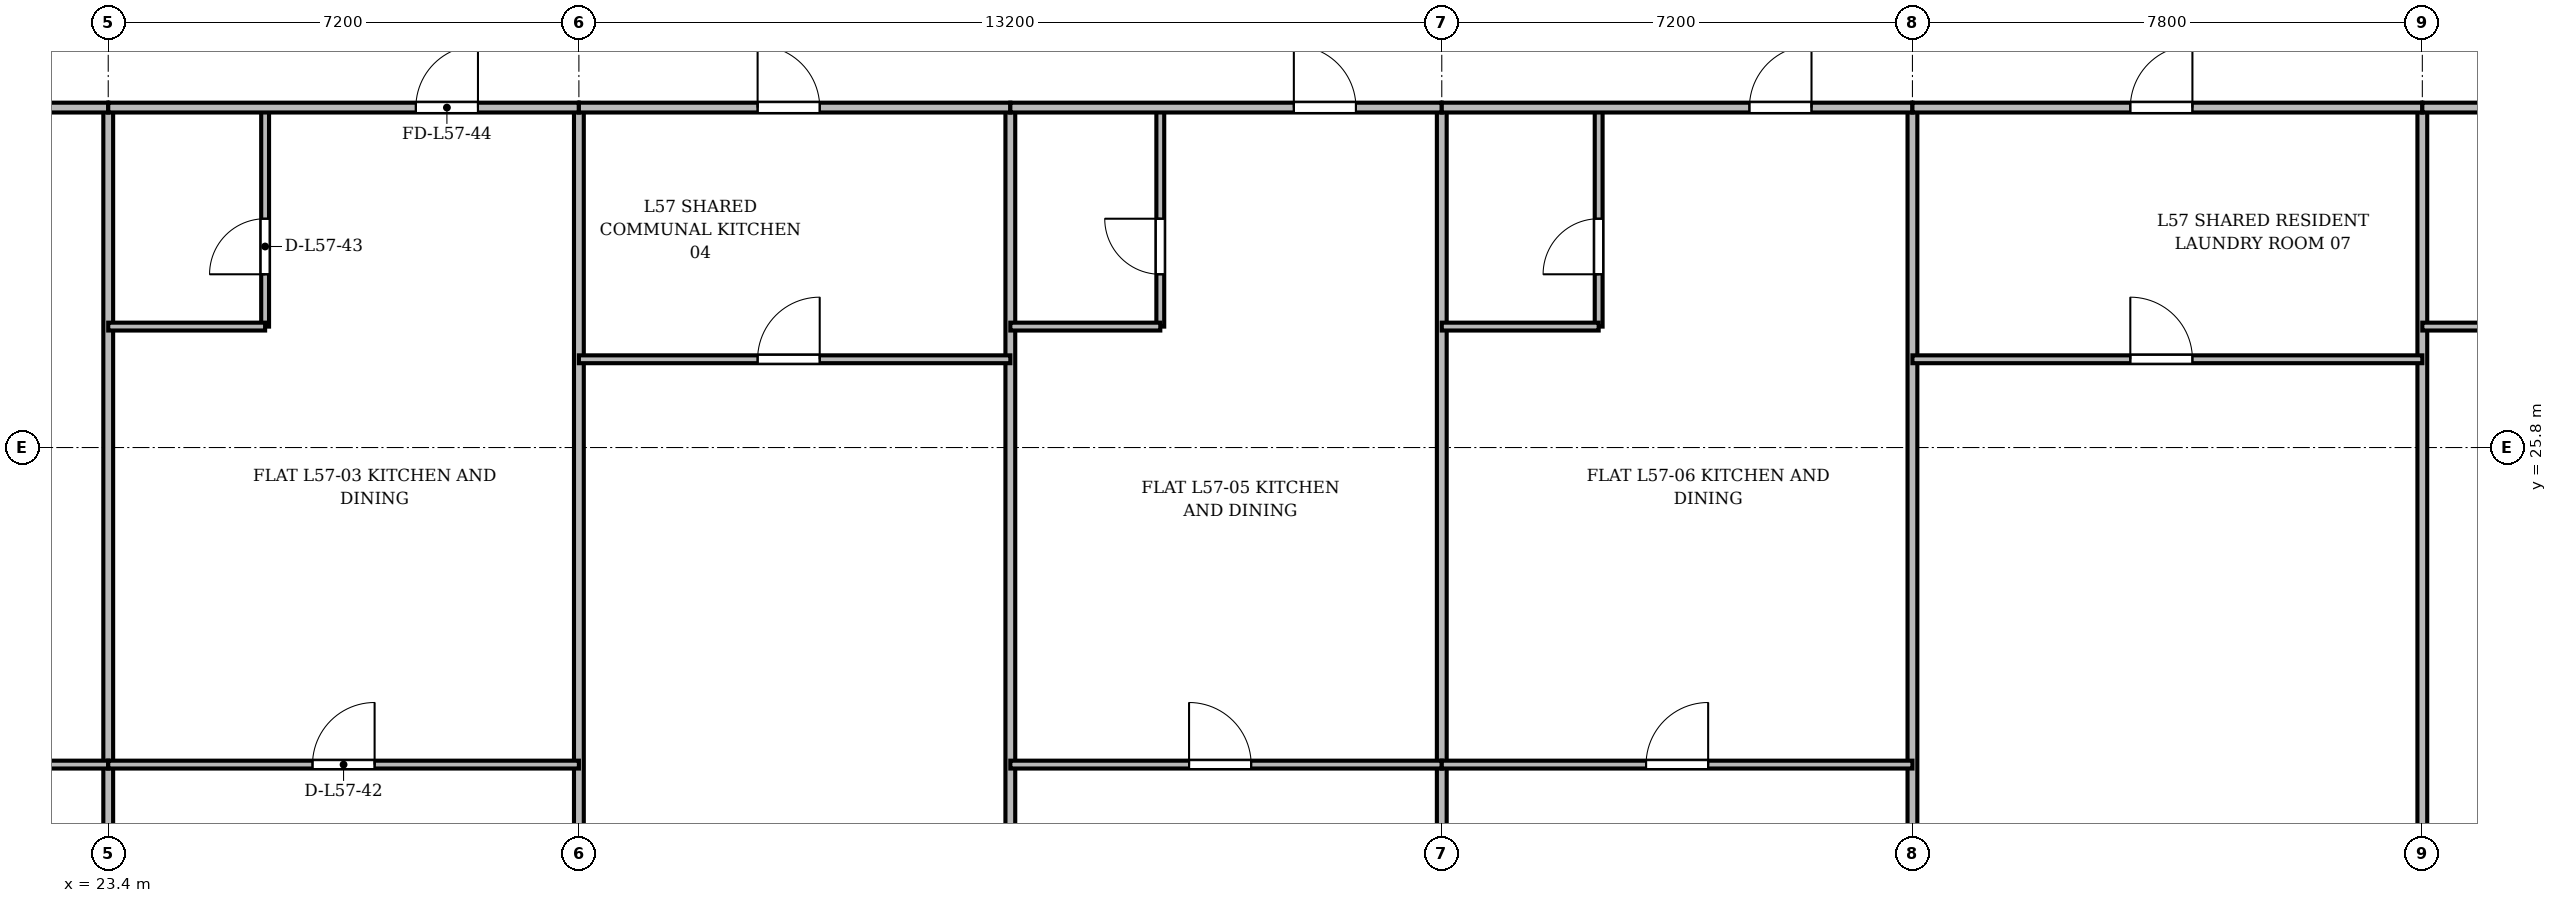
"""IFC4 building model, lengths in metres.
Left out: names, types, materials, properties, quantities, classifications, styles, units other than length and angle.
Written with IfcOpenShell. Run it as: python <this file> out.ifc"""

import sys

from ifc_helpers import new_model, si_unit, direction, frame, frame_2d, origin, place, context, subcontext, project, spatial, rectangle, extrude, source, transform, mapped, element, fill, save


model = new_model("IFC4")
c1 = context("Model", 3, precision=1e-05, world=origin(), true_north=direction((0.0, 1.0)))
c2 = subcontext(c1, "Body", "Model", "MODEL_VIEW")
j1 = project(units=[si_unit("LENGTHUNIT", "METRE"), si_unit("PLANEANGLEUNIT", "RADIAN")], contexts=[c1])
p1 = place(None, origin())
s1 = spatial("IfcSite", under=j1, at=p1, CompositionType="ELEMENT")
p2 = place(p1, origin())
s2 = spatial("IfcBuilding", under=s1, at=p2, CompositionType="ELEMENT")
p3 = place(p2, frame((0.0, 0.0, 219.3)))
s3 = spatial("IfcBuildingStorey", under=s2, at=p3, CompositionType="ELEMENT", Elevation=219.3)
for number, where, z_axis, x_axis in (
    (1, (23.4, 3.625, 0.0), (0.0, 0.0, 1.0), (0.0, 1.0, 0.0)),
    (2, (30.6, 3.625, 0.0), (0.0, 0.0, 1.0), (0.0, 1.0, 0.0)),
):
    element("IfcWall", number, at=place(p3, frame(where, z_axis=z_axis, x_axis=x_axis)), inside=s3, PredefinedType="PARTITIONING", context=c2, shape_type="SweptSolid", body=[
        extrude(rectangle(XDim=27.375, YDim=0.15, at=frame_2d((13.688, 0.0))), origin(), (0.0, 0.0, 1.0), 2.86),
    ])
p4 = place(p3, frame((37.2, 3.625, 0.0), z_axis=(0.0, 0.0, 1.0), x_axis=(0.0, 1.0, 0.0)))
e3 = element("IfcWall", 3, at=p4, inside=s3, PredefinedType="PARTITIONING", context=c2, shape_type="SweptSolid", body=[
    extrude(rectangle(XDim=27.375, YDim=0.15, at=frame_2d((13.688, 0.0))), origin(), (0.0, 0.0, 1.0), 2.91),
])
for number, where, z_axis, x_axis in (
    (4, (43.8, 3.625, 0.0), (0.0, 0.0, 1.0), (0.0, 1.0, 0.0)),
    (5, (51.0, 3.625, 0.0), (0.0, 0.0, 1.0), (0.0, 1.0, 0.0)),
    (6, (58.8, 3.625, 0.0), (0.0, 0.0, 1.0), (0.0, 1.0, 0.0)),
):
    element("IfcWall", number, at=place(p3, frame(where, z_axis=z_axis, x_axis=x_axis)), inside=s3, PredefinedType="PARTITIONING", context=c2, shape_type="SweptSolid", body=[
        extrude(rectangle(XDim=27.375, YDim=0.15, at=frame_2d((13.688, 0.0))), origin(), (0.0, 0.0, 1.0), 2.86),
    ])
p5 = place(p3, frame((15.6, 20.95, 0.0), z_axis=(0.0, 0.0, 1.0), x_axis=(1.0, 0.0, 0.0)))
e7 = element("IfcWall", 7, at=p5, inside=s3, PredefinedType="PARTITIONING", context=c2, shape_type="SweptSolid", body=[
    extrude(rectangle(XDim=7.8, YDim=0.12, at=frame_2d((3.9, 0.0))), origin(), (0.0, 0.0, 1.0), 2.86),
])
p6 = place(p5, frame((3.333, 0.0, 0.0)))
e8 = element("IfcOpeningElement", 8, at=p6, cuts=e7, PredefinedType="OPENING", context=c2, shape_type="SweptSolid", body=[
    extrude(rectangle(XDim=0.95, YDim=2.15, at=frame_2d((0.475, 1.075))), frame((0.0, 0.07, 0.0), z_axis=(0.0, -1.0, 0.0), x_axis=(1.0, 0.0, 0.0)), (0.0, 0.0, 1.0), 0.14),
])
p7 = place(p3, frame((15.6, 31.0, 0.0), z_axis=(0.0, 0.0, 1.0), x_axis=(1.0, 0.0, 0.0)))
e9 = element("IfcWall", 9, at=p7, inside=s3, PredefinedType="PARTITIONING", context=c2, shape_type="SweptSolid", body=[
    extrude(rectangle(XDim=7.8, YDim=0.15, at=frame_2d((3.9, 0.0))), origin(), (0.0, 0.0, 1.0), 2.86),
])
p8 = place(p7, frame((5.172, 0.0, 0.0)))
e10 = element("IfcOpeningElement", 10, at=p8, cuts=e9, PredefinedType="OPENING", context=c2, shape_type="SweptSolid", body=[
    extrude(rectangle(XDim=0.95, YDim=2.15, at=frame_2d((0.475, 1.075))), frame((0.0, 0.085, 0.0), z_axis=(0.0, -1.0, 0.0), x_axis=(1.0, 0.0, 0.0)), (0.0, 0.0, 1.0), 0.17),
])
p9 = place(p3, frame((23.4, 20.95, 0.0), z_axis=(0.0, 0.0, 1.0), x_axis=(1.0, 0.0, 0.0)))
e11 = element("IfcWall", 11, at=p9, inside=s3, PredefinedType="PARTITIONING", context=c2, shape_type="SweptSolid", body=[
    extrude(rectangle(XDim=7.2, YDim=0.12, at=frame_2d((3.6, 0.0))), origin(), (0.0, 0.0, 1.0), 2.86),
])
p10 = place(p9, frame((3.125, 0.0, 0.0)))
e12 = element("IfcOpeningElement", 12, at=p10, cuts=e11, PredefinedType="OPENING", context=c2, shape_type="SweptSolid", body=[
    extrude(rectangle(XDim=0.95, YDim=2.15, at=frame_2d((0.475, 1.075))), frame((0.0, 0.07, 0.0), z_axis=(0.0, -1.0, 0.0), x_axis=(1.0, 0.0, 0.0)), (0.0, 0.0, 1.0), 0.14),
])
p11 = place(p3, frame((25.8, 27.65, 0.0), z_axis=(0.0, 0.0, 1.0), x_axis=(0.0, 1.0, 0.0)))
e13 = element("IfcWall", 13, at=p11, inside=s3, PredefinedType="PARTITIONING", context=c2, shape_type="SweptSolid", body=[
    extrude(rectangle(XDim=3.35, YDim=0.12, at=frame_2d((1.675, 0.0))), origin(), (0.0, 0.0, 1.0), 3.36),
])
p12 = place(p11, frame((0.8, 0.0, 0.0)))
e14 = element("IfcOpeningElement", 14, at=p12, cuts=e13, PredefinedType="OPENING", context=c2, shape_type="SweptSolid", body=[
    extrude(rectangle(XDim=0.85, YDim=2.1, at=frame_2d((0.425, 1.05))), frame((0.0, 0.07, 0.0), z_axis=(0.0, -1.0, 0.0), x_axis=(1.0, 0.0, 0.0)), (0.0, 0.0, 1.0), 0.14),
])
p13 = place(p3, frame((23.4, 27.65, 0.0), z_axis=(0.0, 0.0, 1.0), x_axis=(1.0, 0.0, 0.0)))
e15 = element("IfcWall", 15, at=p13, inside=s3, PredefinedType="PARTITIONING", context=c2, shape_type="SweptSolid", body=[
    extrude(rectangle(XDim=2.4, YDim=0.12, at=frame_2d((1.2, 0.0))), origin(), (0.0, 0.0, 1.0), 2.86),
])
p14 = place(p3, frame((23.4, 31.0, 0.0), z_axis=(0.0, 0.0, 1.0), x_axis=(1.0, 0.0, 0.0)))
e16 = element("IfcWall", 16, at=p14, inside=s3, PredefinedType="PARTITIONING", context=c2, shape_type="SweptSolid", body=[
    extrude(rectangle(XDim=7.2, YDim=0.15, at=frame_2d((3.6, 0.0))), origin(), (0.0, 0.0, 1.0), 2.86),
])
p15 = place(p14, frame((4.706, 0.0, 0.0)))
e17 = element("IfcOpeningElement", 17, at=p15, cuts=e16, PredefinedType="OPENING", context=c2, shape_type="SweptSolid", body=[
    extrude(rectangle(XDim=0.95, YDim=2.15, at=frame_2d((0.475, 1.075))), frame((0.0, 0.085, 0.0), z_axis=(0.0, -1.0, 0.0), x_axis=(1.0, 0.0, 0.0)), (0.0, 0.0, 1.0), 0.17),
])
p16 = place(p3, frame((30.6, 31.0, 0.0), z_axis=(0.0, 0.0, 1.0), x_axis=(1.0, 0.0, 0.0)))
e18 = element("IfcWall", 18, at=p16, inside=s3, PredefinedType="PARTITIONING", context=c2, shape_type="SweptSolid", body=[
    extrude(rectangle(XDim=6.6, YDim=0.15, at=frame_2d((3.3, 0.0))), origin(), (0.0, 0.0, 1.0), 2.86),
])
p17 = place(p16, frame((2.734, 0.0, 0.0)))
e19 = element("IfcOpeningElement", 19, at=p17, cuts=e18, PredefinedType="OPENING", context=c2, shape_type="SweptSolid", body=[
    extrude(rectangle(XDim=0.95, YDim=2.15, at=frame_2d((0.475, 1.075))), frame((0.0, 0.085, 0.0), z_axis=(0.0, -1.0, 0.0), x_axis=(1.0, 0.0, 0.0)), (0.0, 0.0, 1.0), 0.17),
])
p18 = place(p3, frame((30.6, 27.15, 0.0), z_axis=(0.0, 0.0, 1.0), x_axis=(1.0, 0.0, 0.0)))
e20 = element("IfcWall", 20, at=p18, inside=s3, PredefinedType="PARTITIONING", context=c2, shape_type="SweptSolid", body=[
    extrude(rectangle(XDim=6.6, YDim=0.12, at=frame_2d((3.3, 0.0))), origin(), (0.0, 0.0, 1.0), 2.86),
])
p19 = place(p18, frame((2.734, 0.0, 0.0)))
e21 = element("IfcOpeningElement", 21, at=p19, cuts=e20, PredefinedType="OPENING", context=c2, shape_type="SweptSolid", body=[
    extrude(rectangle(XDim=0.95, YDim=2.15, at=frame_2d((0.475, 1.075))), frame((0.0, 0.07, 0.0), z_axis=(0.0, -1.0, 0.0), x_axis=(1.0, 0.0, 0.0)), (0.0, 0.0, 1.0), 0.14),
])
p20 = place(p3, frame((37.2, 20.95, 0.0), z_axis=(0.0, 0.0, 1.0), x_axis=(1.0, 0.0, 0.0)))
e22 = element("IfcWall", 22, at=p20, inside=s3, PredefinedType="PARTITIONING", context=c2, shape_type="SweptSolid", body=[
    extrude(rectangle(XDim=6.6, YDim=0.12, at=frame_2d((3.3, 0.0))), origin(), (0.0, 0.0, 1.0), 2.86),
])
p21 = place(p20, frame((2.734, 0.0, 0.0)))
e23 = element("IfcOpeningElement", 23, at=p21, cuts=e22, PredefinedType="OPENING", context=c2, shape_type="SweptSolid", body=[
    extrude(rectangle(XDim=0.95, YDim=2.15, at=frame_2d((0.475, 1.075))), frame((0.0, 0.07, 0.0), z_axis=(0.0, -1.0, 0.0), x_axis=(1.0, 0.0, 0.0)), (0.0, 0.0, 1.0), 0.14),
])
p22 = place(p3, frame((39.494, 27.65, 0.0), z_axis=(0.0, 0.0, 1.0), x_axis=(0.0, 1.0, 0.0)))
e24 = element("IfcWall", 24, at=p22, inside=s3, PredefinedType="PARTITIONING", context=c2, shape_type="SweptSolid", body=[
    extrude(rectangle(XDim=3.35, YDim=0.12, at=frame_2d((1.675, 0.0))), origin(), (0.0, 0.0, 1.0), 3.36),
])
p23 = place(p22, frame((0.8, 0.0, 0.0)))
e25 = element("IfcOpeningElement", 25, at=p23, cuts=e24, PredefinedType="OPENING", context=c2, shape_type="SweptSolid", body=[
    extrude(rectangle(XDim=0.85, YDim=2.1, at=frame_2d((0.425, 1.05))), frame((0.0, 0.07, 0.0), z_axis=(0.0, -1.0, 0.0), x_axis=(1.0, 0.0, 0.0)), (0.0, 0.0, 1.0), 0.14),
])
p24 = place(p3, frame((37.2, 27.65, 0.0), z_axis=(0.0, 0.0, 1.0), x_axis=(1.0, 0.0, 0.0)))
e26 = element("IfcWall", 26, at=p24, inside=s3, PredefinedType="PARTITIONING", context=c2, shape_type="SweptSolid", body=[
    extrude(rectangle(XDim=2.294, YDim=0.12, at=frame_2d((1.147, 0.0))), origin(), (0.0, 0.0, 1.0), 3.36),
])
p25 = place(p3, frame((37.2, 31.0, 0.0), z_axis=(0.0, 0.0, 1.0), x_axis=(1.0, 0.0, 0.0)))
e27 = element("IfcWall", 27, at=p25, inside=s3, PredefinedType="PARTITIONING", context=c2, shape_type="SweptSolid", body=[
    extrude(rectangle(XDim=6.6, YDim=0.15, at=frame_2d((3.3, 0.0))), origin(), (0.0, 0.0, 1.0), 2.86),
])
p26 = place(p25, frame((4.337, 0.0, 0.0)))
e28 = element("IfcOpeningElement", 28, at=p26, cuts=e27, PredefinedType="OPENING", context=c2, shape_type="SweptSolid", body=[
    extrude(rectangle(XDim=0.95, YDim=2.15, at=frame_2d((0.475, 1.075))), frame((0.0, 0.085, 0.0), z_axis=(0.0, -1.0, 0.0), x_axis=(1.0, 0.0, 0.0)), (0.0, 0.0, 1.0), 0.17),
])
p27 = place(p3, frame((43.8, 20.95, 0.0), z_axis=(0.0, 0.0, 1.0), x_axis=(1.0, 0.0, 0.0)))
e29 = element("IfcWall", 29, at=p27, inside=s3, PredefinedType="PARTITIONING", context=c2, shape_type="SweptSolid", body=[
    extrude(rectangle(XDim=7.2, YDim=0.12, at=frame_2d((3.6, 0.0))), origin(), (0.0, 0.0, 1.0), 2.86),
])
p28 = place(p27, frame((3.125, 0.0, 0.0)))
e30 = element("IfcOpeningElement", 30, at=p28, cuts=e29, PredefinedType="OPENING", context=c2, shape_type="SweptSolid", body=[
    extrude(rectangle(XDim=0.95, YDim=2.15, at=frame_2d((0.475, 1.075))), frame((0.0, 0.07, 0.0), z_axis=(0.0, -1.0, 0.0), x_axis=(1.0, 0.0, 0.0)), (0.0, 0.0, 1.0), 0.14),
])
p29 = place(p3, frame((46.2, 27.65, 0.0), z_axis=(0.0, 0.0, 1.0), x_axis=(0.0, 1.0, 0.0)))
e31 = element("IfcWall", 31, at=p29, inside=s3, PredefinedType="PARTITIONING", context=c2, shape_type="SweptSolid", body=[
    extrude(rectangle(XDim=3.35, YDim=0.12, at=frame_2d((1.675, 0.0))), origin(), (0.0, 0.0, 1.0), 3.36),
])
p30 = place(p29, frame((0.8, 0.0, 0.0)))
e32 = element("IfcOpeningElement", 32, at=p30, cuts=e31, PredefinedType="OPENING", context=c2, shape_type="SweptSolid", body=[
    extrude(rectangle(XDim=0.85, YDim=2.1, at=frame_2d((0.425, 1.05))), frame((0.0, 0.07, 0.0), z_axis=(0.0, -1.0, 0.0), x_axis=(1.0, 0.0, 0.0)), (0.0, 0.0, 1.0), 0.14),
])
p31 = place(p3, frame((43.8, 27.65, 0.0), z_axis=(0.0, 0.0, 1.0), x_axis=(1.0, 0.0, 0.0)))
e33 = element("IfcWall", 33, at=p31, inside=s3, PredefinedType="PARTITIONING", context=c2, shape_type="SweptSolid", body=[
    extrude(rectangle(XDim=2.4, YDim=0.12, at=frame_2d((1.2, 0.0))), origin(), (0.0, 0.0, 1.0), 2.86),
])
p32 = place(p3, frame((43.8, 31.0, 0.0), z_axis=(0.0, 0.0, 1.0), x_axis=(1.0, 0.0, 0.0)))
e34 = element("IfcWall", 34, at=p32, inside=s3, PredefinedType="PARTITIONING", context=c2, shape_type="SweptSolid", body=[
    extrude(rectangle(XDim=7.2, YDim=0.15, at=frame_2d((3.6, 0.0))), origin(), (0.0, 0.0, 1.0), 2.86),
])
p33 = place(p32, frame((4.706, 0.0, 0.0)))
e35 = element("IfcOpeningElement", 35, at=p33, cuts=e34, PredefinedType="OPENING", context=c2, shape_type="SweptSolid", body=[
    extrude(rectangle(XDim=0.95, YDim=2.15, at=frame_2d((0.475, 1.075))), frame((0.0, 0.085, 0.0), z_axis=(0.0, -1.0, 0.0), x_axis=(1.0, 0.0, 0.0)), (0.0, 0.0, 1.0), 0.17),
])
p34 = place(p3, frame((51.0, 31.0, 0.0), z_axis=(0.0, 0.0, 1.0), x_axis=(1.0, 0.0, 0.0)))
e36 = element("IfcWall", 36, at=p34, inside=s3, PredefinedType="PARTITIONING", context=c2, shape_type="SweptSolid", body=[
    extrude(rectangle(XDim=7.8, YDim=0.15, at=frame_2d((3.9, 0.0))), origin(), (0.0, 0.0, 1.0), 2.86),
])
p35 = place(p34, frame((3.333, 0.0, 0.0)))
e37 = element("IfcOpeningElement", 37, at=p35, cuts=e36, PredefinedType="OPENING", context=c2, shape_type="SweptSolid", body=[
    extrude(rectangle(XDim=0.95, YDim=2.15, at=frame_2d((0.475, 1.075))), frame((0.0, 0.085, 0.0), z_axis=(0.0, -1.0, 0.0), x_axis=(1.0, 0.0, 0.0)), (0.0, 0.0, 1.0), 0.17),
])
p36 = place(p3, frame((51.0, 27.15, 0.0), z_axis=(0.0, 0.0, 1.0), x_axis=(1.0, 0.0, 0.0)))
e38 = element("IfcWall", 38, at=p36, inside=s3, PredefinedType="PARTITIONING", context=c2, shape_type="SweptSolid", body=[
    extrude(rectangle(XDim=7.8, YDim=0.12, at=frame_2d((3.9, 0.0))), origin(), (0.0, 0.0, 1.0), 2.86),
])
p37 = place(p36, frame((3.333, 0.0, 0.0)))
e39 = element("IfcOpeningElement", 39, at=p37, cuts=e38, PredefinedType="OPENING", context=c2, shape_type="SweptSolid", body=[
    extrude(rectangle(XDim=0.95, YDim=2.15, at=frame_2d((0.475, 1.075))), frame((0.0, 0.07, 0.0), z_axis=(0.0, -1.0, 0.0), x_axis=(1.0, 0.0, 0.0)), (0.0, 0.0, 1.0), 0.14),
])
p38 = place(p3, frame((58.8, 27.65, 0.0), z_axis=(0.0, 0.0, 1.0), x_axis=(1.0, 0.0, 0.0)))
e40 = element("IfcWall", 40, at=p38, inside=s3, PredefinedType="PARTITIONING", context=c2, shape_type="SweptSolid", body=[
    extrude(rectangle(XDim=2.4, YDim=0.12, at=frame_2d((1.2, 0.0))), origin(), (0.0, 0.0, 1.0), 2.86),
])
p39 = place(p3, frame((58.8, 31.0, 0.0), z_axis=(0.0, 0.0, 1.0), x_axis=(1.0, 0.0, 0.0)))
e41 = element("IfcWall", 41, at=p39, inside=s3, PredefinedType="PARTITIONING", context=c2, shape_type="SweptSolid", body=[
    extrude(rectangle(XDim=7.375, YDim=0.15, at=frame_2d((3.688, 0.0))), origin(), (0.0, 0.0, 1.0), 2.86),
])
p40 = place(p39, frame((4.877, 0.0, 0.0)))
e42 = element("IfcOpeningElement", 42, at=p40, cuts=e41, PredefinedType="OPENING", context=c2, shape_type="SweptSolid", body=[
    extrude(rectangle(XDim=0.95, YDim=2.15, at=frame_2d((0.475, 1.075))), frame((0.0, 0.085, 0.0), z_axis=(0.0, -1.0, 0.0), x_axis=(1.0, 0.0, 0.0)), (0.0, 0.0, 1.0), 0.17),
])
m1 = source(origin(), c2, "Body", "SweptSolid", [
    extrude(rectangle(XDim=0.95, YDim=2.15, at=frame_2d((0.475, 1.075))), frame((0.0, 0.025, 0.0), z_axis=(0.0, -1.0, 0.0), x_axis=(1.0, 0.0, 0.0)), (0.0, 0.0, 1.0), 0.05),
])
p41 = place(p10, origin())
e43 = element("IfcDoor", 43, at=p41, inside=s3, OperationType="SINGLE_SWING_RIGHT", PredefinedType="DOOR", context=c2, shape_type="MappedRepresentation", body=[
    mapped(m1, transform((0.0, 0.0, 0.0), x_axis=(1.0, 0.0, 0.0), y_axis=(0.0, 1.0, 0.0), z_axis=(0.0, 0.0, 1.0), scale=1.0)),
])
fill(e12, e43)
m2 = source(origin(), c2, "Body", "SweptSolid", [
    extrude(rectangle(XDim=0.85, YDim=2.1, at=frame_2d((0.425, 1.05))), frame((0.0, 0.025, 0.0), z_axis=(0.0, -1.0, 0.0), x_axis=(1.0, 0.0, 0.0)), (0.0, 0.0, 1.0), 0.05),
])
p42 = place(p12, origin())
e44 = element("IfcDoor", 44, at=p42, inside=s3, OperationType="SINGLE_SWING_LEFT", PredefinedType="DOOR", context=c2, shape_type="MappedRepresentation", body=[
    mapped(m2, transform((0.0, 0.0, 0.0), x_axis=(1.0, 0.0, 0.0), y_axis=(0.0, 1.0, 0.0), z_axis=(0.0, 0.0, 1.0), scale=1.0)),
])
fill(e14, e44)
p43 = place(p15, origin())
e45 = element("IfcDoor", 45, at=p43, inside=s3, OperationType="SINGLE_SWING_RIGHT", PredefinedType="DOOR", context=c2, shape_type="MappedRepresentation", body=[
    mapped(m1, transform((0.0, 0.0, 0.0), x_axis=(1.0, 0.0, 0.0), y_axis=(0.0, 1.0, 0.0), z_axis=(0.0, 0.0, 1.0), scale=1.0)),
])
fill(e17, e45)
p44 = place(p17, origin())
e46 = element("IfcDoor", 46, at=p44, inside=s3, OperationType="SINGLE_SWING_LEFT", PredefinedType="DOOR", context=c2, shape_type="MappedRepresentation", body=[
    mapped(m1, transform((0.0, 0.0, 0.0), x_axis=(1.0, 0.0, 0.0), y_axis=(0.0, 1.0, 0.0), z_axis=(0.0, 0.0, 1.0), scale=1.0)),
])
fill(e19, e46)
p45 = place(p19, origin())
e47 = element("IfcDoor", 47, at=p45, inside=s3, OperationType="SINGLE_SWING_RIGHT", PredefinedType="DOOR", context=c2, shape_type="MappedRepresentation", body=[
    mapped(m1, transform((0.0, 0.0, 0.0), x_axis=(1.0, 0.0, 0.0), y_axis=(0.0, 1.0, 0.0), z_axis=(0.0, 0.0, 1.0), scale=1.0)),
])
fill(e21, e47)
p46 = place(p21, origin())
e48 = element("IfcDoor", 48, at=p46, inside=s3, OperationType="SINGLE_SWING_LEFT", PredefinedType="DOOR", context=c2, shape_type="MappedRepresentation", body=[
    mapped(m1, transform((0.0, 0.0, 0.0), x_axis=(1.0, 0.0, 0.0), y_axis=(0.0, 1.0, 0.0), z_axis=(0.0, 0.0, 1.0), scale=1.0)),
])
fill(e23, e48)
p47 = place(p23, origin())
e49 = element("IfcDoor", 49, at=p47, inside=s3, OperationType="SINGLE_SWING_RIGHT", PredefinedType="DOOR", context=c2, shape_type="MappedRepresentation", body=[
    mapped(m2, transform((0.0, 0.0, 0.0), x_axis=(1.0, 0.0, 0.0), y_axis=(0.0, 1.0, 0.0), z_axis=(0.0, 0.0, 1.0), scale=1.0)),
])
fill(e25, e49)
p48 = place(p26, origin())
e50 = element("IfcDoor", 50, at=p48, inside=s3, OperationType="SINGLE_SWING_LEFT", PredefinedType="DOOR", context=c2, shape_type="MappedRepresentation", body=[
    mapped(m1, transform((0.0, 0.0, 0.0), x_axis=(1.0, 0.0, 0.0), y_axis=(0.0, 1.0, 0.0), z_axis=(0.0, 0.0, 1.0), scale=1.0)),
])
fill(e28, e50)
p49 = place(p28, origin())
e51 = element("IfcDoor", 51, at=p49, inside=s3, OperationType="SINGLE_SWING_RIGHT", PredefinedType="DOOR", context=c2, shape_type="MappedRepresentation", body=[
    mapped(m1, transform((0.0, 0.0, 0.0), x_axis=(1.0, 0.0, 0.0), y_axis=(0.0, 1.0, 0.0), z_axis=(0.0, 0.0, 1.0), scale=1.0)),
])
fill(e30, e51)
p50 = place(p30, origin())
e52 = element("IfcDoor", 52, at=p50, inside=s3, OperationType="SINGLE_SWING_LEFT", PredefinedType="DOOR", context=c2, shape_type="MappedRepresentation", body=[
    mapped(m2, transform((0.0, 0.0, 0.0), x_axis=(1.0, 0.0, 0.0), y_axis=(0.0, 1.0, 0.0), z_axis=(0.0, 0.0, 1.0), scale=1.0)),
])
fill(e32, e52)
p51 = place(p33, origin())
e53 = element("IfcDoor", 53, at=p51, inside=s3, OperationType="SINGLE_SWING_RIGHT", PredefinedType="DOOR", context=c2, shape_type="MappedRepresentation", body=[
    mapped(m1, transform((0.0, 0.0, 0.0), x_axis=(1.0, 0.0, 0.0), y_axis=(0.0, 1.0, 0.0), z_axis=(0.0, 0.0, 1.0), scale=1.0)),
])
fill(e35, e53)
p52 = place(p35, origin())
e54 = element("IfcDoor", 54, at=p52, inside=s3, OperationType="SINGLE_SWING_RIGHT", PredefinedType="DOOR", context=c2, shape_type="MappedRepresentation", body=[
    mapped(m1, transform((0.0, 0.0, 0.0), x_axis=(1.0, 0.0, 0.0), y_axis=(0.0, 1.0, 0.0), z_axis=(0.0, 0.0, 1.0), scale=1.0)),
])
fill(e37, e54)
p53 = place(p37, origin())
e55 = element("IfcDoor", 55, at=p53, inside=s3, OperationType="SINGLE_SWING_LEFT", PredefinedType="DOOR", context=c2, shape_type="MappedRepresentation", body=[
    mapped(m1, transform((0.0, 0.0, 0.0), x_axis=(1.0, 0.0, 0.0), y_axis=(0.0, 1.0, 0.0), z_axis=(0.0, 0.0, 1.0), scale=1.0)),
])
fill(e39, e55)
save(model, sys.argv[1])
